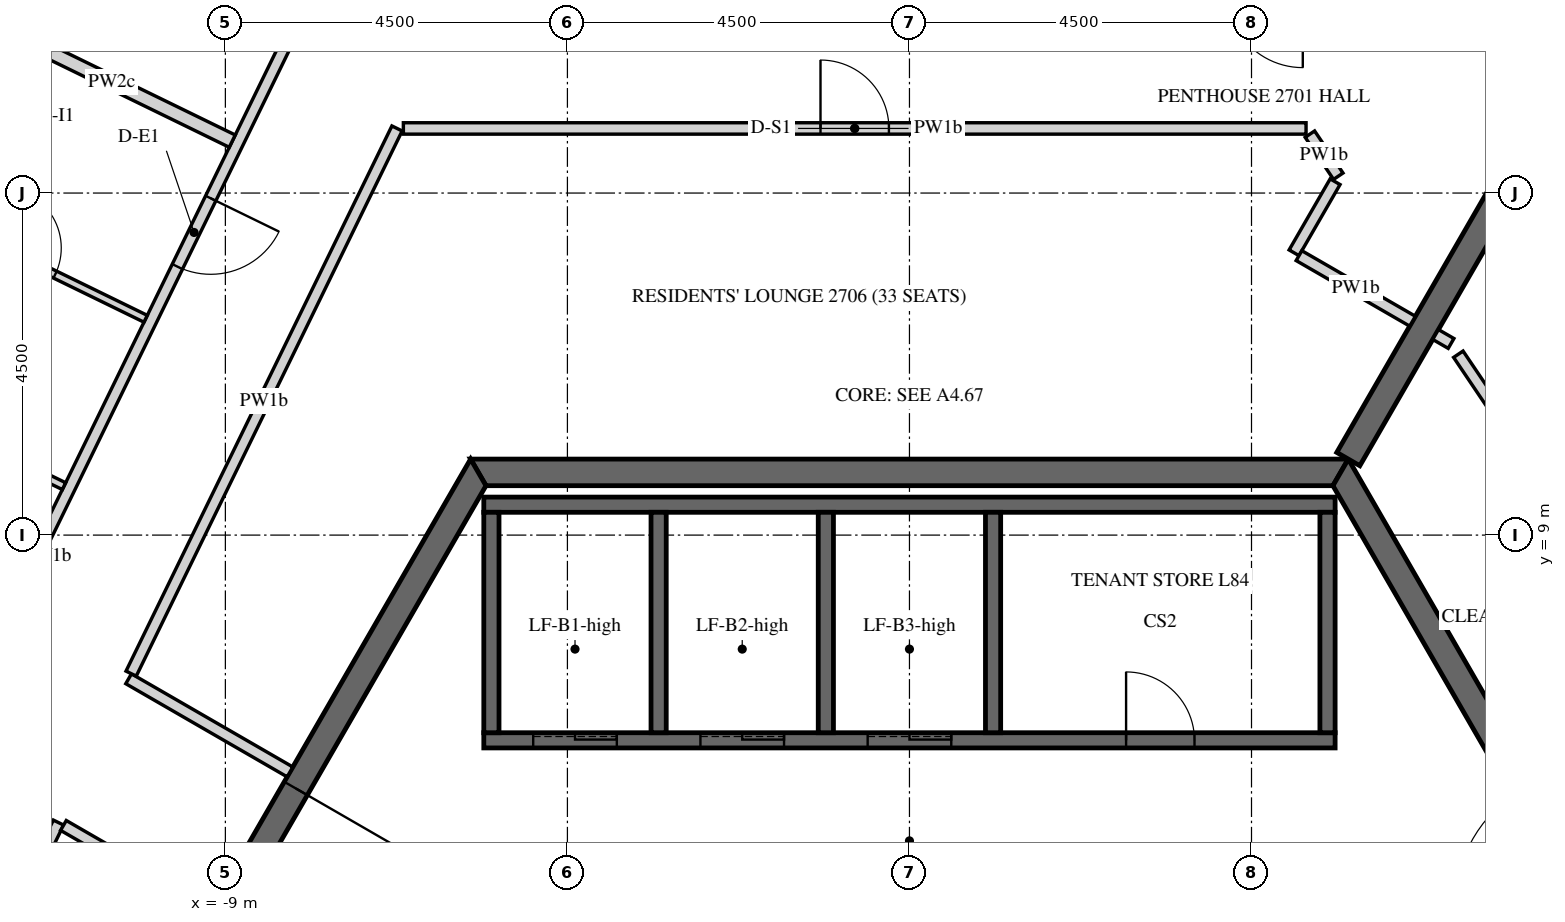
"""IFC4 building model, lengths in metres.
Left out: names, types, materials, properties, quantities, classifications, styles, units other than length and angle.
Written with IfcOpenShell. Run it as: python <this file> out.ifc"""

import sys

from ifc_helpers import new_model, si_unit, direction, frame, frame_2d, origin, place, context, subcontext, project, spatial, polyline, rectangle, outline, extrude, element, fill, save


model = new_model("IFC4")
c1 = context("Model", 3, precision=1e-05, world=origin(), true_north=direction((0.0, 1.0)))
c2 = subcontext(c1, "Body", "Model", "MODEL_VIEW")
j1 = project(units=[si_unit("LENGTHUNIT", "METRE"), si_unit("PLANEANGLEUNIT", "RADIAN")], contexts=[c1])
p1 = place(None, origin())
s1 = spatial("IfcSite", under=j1, at=p1, CompositionType="ELEMENT")
p2 = place(p1, origin())
s2 = spatial("IfcBuilding", under=s1, at=p2, CompositionType="ELEMENT")
p3 = place(p2, frame((0.0, 0.0, 349.5)))
s3 = spatial("IfcBuildingStorey", under=s2, at=p3, CompositionType="ELEMENT", Elevation=349.5)
p4 = place(p3, frame((-5.673, 9.825, 0.0), z_axis=(0.0, 0.0, 1.0), x_axis=(-0.499995046907, -0.866028263435, 0.0)))
e1 = element("IfcWall", 1, at=p4, inside=s3, PredefinedType="SHEAR", context=c2, shape_type="SweptSolid", body=[
    extrude(outline(polyline([(-0.101, -0.175), (11.446, -0.175), (11.244, 0.175), (0.101, 0.175), (-0.101, -0.175)])), origin(), (0.0, 0.0, 1.0), 3.75),
])
p5 = place(p4, frame((4.801, 0.0, 0.0)))
e2 = element("IfcOpeningElement", 2, at=p5, cuts=e1, PredefinedType="OPENING", context=c2, shape_type="SweptSolid", body=[
    extrude(rectangle(XDim=1.8, YDim=2.4, at=frame_2d((0.9, 1.2))), frame((0.0, 0.185, 0.0), z_axis=(0.0, -1.0, 0.0), x_axis=(1.0, 0.0, 0.0)), (0.0, 0.0, 1.0), 0.37),
])
p6 = place(p3, frame((11.345, 0.0, 0.0), z_axis=(0.0, 0.0, 1.0), x_axis=(-0.499995046907, 0.866028263435, 0.0)))
e3 = element("IfcWall", 3, at=p6, inside=s3, PredefinedType="SHEAR", context=c2, shape_type="SweptSolid", body=[
    extrude(outline(polyline([(-0.101, -0.175), (11.446, -0.175), (11.244, 0.175), (0.101, 0.175), (-0.101, -0.175)])), origin(), (0.0, 0.0, 1.0), 3.75),
])
p7 = place(p6, frame((4.744, 0.0, 0.0)))
e4 = element("IfcOpeningElement", 4, at=p7, cuts=e3, PredefinedType="OPENING", context=c2, shape_type="SweptSolid", body=[
    extrude(rectangle(XDim=1.8, YDim=2.4, at=frame_2d((0.9, 1.2))), frame((0.0, 0.185, 0.0), z_axis=(0.0, -1.0, 0.0), x_axis=(1.0, 0.0, 0.0)), (0.0, 0.0, 1.0), 0.37),
])
p8 = place(p3, frame((5.673, 9.825, 0.0), z_axis=(0.0, 0.0, 1.0), x_axis=(-1.0, 0.0, 0.0)))
e5 = element("IfcWall", 5, at=p8, inside=s3, PredefinedType="SHEAR", context=c2, shape_type="SweptSolid", body=[
    extrude(outline(polyline([(-0.101, -0.175), (11.446, -0.175), (11.244, 0.175), (0.101, 0.175), (-0.101, -0.175)])), origin(), (0.0, 0.0, 1.0), 3.75),
])
p9 = place(p3, frame((5.773, 10.0, 0.0), z_axis=(0.0, 0.0, 1.0), x_axis=(0.500007911273, 0.866020836161, 0.0)))
e6 = element("IfcWall", 6, at=p9, inside=s3, PredefinedType="SHEAR", context=c2, shape_type="SweptSolid", body=[
    extrude(rectangle(XDim=14.51, YDim=0.35, at=frame_2d((7.255, 0.0))), origin(), (0.0, 0.0, 1.0), 3.75),
])
p10 = place(p9, frame((6.355, 0.0, 0.0)))
e7 = element("IfcOpeningElement", 7, at=p10, cuts=e6, PredefinedType="OPENING", context=c2, shape_type="SweptSolid", body=[
    extrude(rectangle(XDim=1.8, YDim=2.4, at=frame_2d((0.9, 1.2))), frame((0.0, 0.185, 0.0), z_axis=(0.0, -1.0, 0.0), x_axis=(1.0, 0.0, 0.0)), (0.0, 0.0, 1.0), 0.37),
])
p11 = place(p3, frame((-5.6, 6.3, -0.5), z_axis=(0.0, 0.0, 1.0), x_axis=(1.0, 0.0, 0.0)))
e8 = element("IfcWall", 8, at=p11, inside=s3, PredefinedType="SHEAR", context=c2, shape_type="SweptSolid", body=[
    extrude(rectangle(XDim=11.2, YDim=0.2, at=frame_2d((5.6, 0.0))), origin(), (0.0, 0.0, 1.0), 4.15),
])
p12 = place(p11, frame((8.45, 0.0, 0.5)))
e9 = element("IfcOpeningElement", 9, at=p12, cuts=e8, PredefinedType="OPENING", context=c2, shape_type="SweptSolid", body=[
    extrude(rectangle(XDim=0.9, YDim=2.1, at=frame_2d((0.45, 1.05))), frame((0.0, 0.11, 0.0), z_axis=(0.0, -1.0, 0.0), x_axis=(1.0, 0.0, 0.0)), (0.0, 0.0, 1.0), 0.22),
])
p13 = place(p11, frame((0.65, 0.0, 0.5)))
e10 = element("IfcOpeningElement", 10, at=p13, cuts=e8, PredefinedType="OPENING", context=c2, shape_type="SweptSolid", body=[
    extrude(rectangle(XDim=1.1, YDim=2.1, at=frame_2d((0.55, 1.05))), frame((0.0, 0.11, 0.0), z_axis=(0.0, -1.0, 0.0), x_axis=(1.0, 0.0, 0.0)), (0.0, 0.0, 1.0), 0.22),
])
p14 = place(p11, frame((2.85, 0.0, 0.5)))
e11 = element("IfcOpeningElement", 11, at=p14, cuts=e8, PredefinedType="OPENING", context=c2, shape_type="SweptSolid", body=[
    extrude(rectangle(XDim=1.1, YDim=2.1, at=frame_2d((0.55, 1.05))), frame((0.0, 0.11, 0.0), z_axis=(0.0, -1.0, 0.0), x_axis=(1.0, 0.0, 0.0)), (0.0, 0.0, 1.0), 0.22),
])
p15 = place(p11, frame((5.05, 0.0, 0.5)))
e12 = element("IfcOpeningElement", 12, at=p15, cuts=e8, PredefinedType="OPENING", context=c2, shape_type="SweptSolid", body=[
    extrude(rectangle(XDim=1.1, YDim=2.1, at=frame_2d((0.55, 1.05))), frame((0.0, 0.11, 0.0), z_axis=(0.0, -1.0, 0.0), x_axis=(1.0, 0.0, 0.0)), (0.0, 0.0, 1.0), 0.22),
])
p16 = place(p3, frame((-5.6, 9.4, -0.5), z_axis=(0.0, 0.0, 1.0), x_axis=(1.0, 0.0, 0.0)))
e13 = element("IfcWall", 13, at=p16, inside=s3, PredefinedType="SHEAR", context=c2, shape_type="SweptSolid", body=[
    extrude(rectangle(XDim=11.2, YDim=0.2, at=frame_2d((5.6, 0.0))), origin(), (0.0, 0.0, 1.0), 4.15),
])
for number, where, z_axis, x_axis in (
    (14, (-5.5, 6.4, -0.5), (0.0, 0.0, 1.0), (0.0, 1.0, 0.0)),
    (15, (-3.3, 6.4, -0.5), (0.0, 0.0, 1.0), (0.0, 1.0, 0.0)),
    (16, (-1.1, 6.4, -0.5), (0.0, 0.0, 1.0), (0.0, 1.0, 0.0)),
    (17, (1.1, 6.4, -0.5), (0.0, 0.0, 1.0), (0.0, 1.0, 0.0)),
    (18, (5.5, 6.4, -0.5), (0.0, 0.0, 1.0), (0.0, 1.0, 0.0)),
):
    element("IfcWall", number, at=place(p3, frame(where, z_axis=z_axis, x_axis=x_axis)), inside=s3, PredefinedType="SHEAR", context=c2, shape_type="SweptSolid", body=[
        extrude(rectangle(XDim=2.9, YDim=0.2, at=frame_2d((1.45, 0.0))), origin(), (0.0, 0.0, 1.0), 4.15),
    ])
p17 = place(p3, frame((-7.903, 16.075, 0.0), z_axis=(0.0, 0.0, 1.0), x_axis=(-0.438364761272, -0.898797160696, 0.0)))
e19 = element("IfcWall", 19, at=p17, inside=s3, PredefinedType="PARTITIONING", context=c2, shape_type="SweptSolid", body=[
    extrude(rectangle(XDim=15.688, YDim=0.15, at=frame_2d((7.844, 0.0))), origin(), (0.0, 0.0, 1.0), 2.82),
])
p18 = place(p17, frame((2.942, 0.0, 0.0)))
e20 = element("IfcOpeningElement", 20, at=p18, cuts=e19, PredefinedType="OPENING", context=c2, shape_type="SweptSolid", body=[
    extrude(rectangle(XDim=1.0, YDim=2.1, at=frame_2d((0.5, 1.05))), frame((0.0, 0.085, 0.0), z_axis=(0.0, -1.0, 0.0), x_axis=(1.0, 0.0, 0.0)), (0.0, 0.0, 1.0), 0.17),
])
p19 = place(p3, frame((-13.466, 0.564, 0.0), z_axis=(0.0, 0.0, 1.0), x_axis=(0.438366040624, 0.898796536724, 0.0)))
e21 = element("IfcWall", 21, at=p19, inside=s3, PredefinedType="PARTITIONING", context=c2, shape_type="SweptSolid", body=[
    extrude(rectangle(XDim=5.178, YDim=0.15, at=frame_2d((2.589, 0.0))), origin(), (0.0, 0.0, 1.0), 2.82),
])
p20 = place(p3, frame((-11.131, 5.18, 0.0), z_axis=(0.0, 0.0, 1.0), x_axis=(0.866037886895, -0.499978377995, 0.0)))
e22 = element("IfcWall", 22, at=p20, inside=s3, PredefinedType="PARTITIONING", context=c2, shape_type="SweptSolid", body=[
    extrude(rectangle(XDim=2.229, YDim=0.15, at=frame_2d((1.115, 0.0))), origin(), (0.0, 0.0, 1.0), 2.82),
])
p21 = place(p3, frame((-8.15, 5.884, 0.0), z_axis=(0.0, 0.0, 1.0), x_axis=(-0.866009790468, 0.500027042082, 0.0)))
e23 = element("IfcWall", 23, at=p21, inside=s3, PredefinedType="PARTITIONING", context=c2, shape_type="SweptSolid", body=[
    extrude(rectangle(XDim=2.451, YDim=0.15, at=frame_2d((1.226, 0.0))), origin(), (0.0, 0.0, 1.0), 2.82),
])
p22 = place(p3, frame((-10.24, 7.178, 0.0), z_axis=(0.0, 0.0, 1.0), x_axis=(0.438356120288, 0.898801375058, 0.0)))
e24 = element("IfcWall", 24, at=p22, inside=s3, PredefinedType="PARTITIONING", context=c2, shape_type="SweptSolid", body=[
    extrude(rectangle(XDim=7.98, YDim=0.15, at=frame_2d((3.99, 0.0))), origin(), (0.0, 0.0, 1.0), 2.82),
])
p23 = place(p3, frame((-6.658, 14.35, 0.0), z_axis=(0.0, 0.0, 1.0), x_axis=(1.0, 0.0, 0.0)))
e25 = element("IfcWall", 25, at=p23, inside=s3, PredefinedType="PARTITIONING", context=c2, shape_type="SweptSolid", body=[
    extrude(rectangle(XDim=11.876, YDim=0.15, at=frame_2d((5.938, 0.0))), origin(), (0.0, 0.0, 1.0), 2.82),
])
p24 = place(p23, frame((5.488, 0.0, 0.0)))
e26 = element("IfcOpeningElement", 26, at=p24, cuts=e25, PredefinedType="OPENING", context=c2, shape_type="SweptSolid", body=[
    extrude(rectangle(XDim=0.9, YDim=2.1, at=frame_2d((0.45, 1.05))), frame((0.0, 0.085, 0.0), z_axis=(0.0, -1.0, 0.0), x_axis=(1.0, 0.0, 0.0)), (0.0, 0.0, 1.0), 0.17),
])
p25 = place(p3, frame((5.268, 14.275, 0.0), z_axis=(0.0, 0.0, 1.0), x_axis=(0.559416337009, -0.828886820915, 0.0)))
e27 = element("IfcWall", 27, at=p25, inside=s3, PredefinedType="PARTITIONING", context=c2, shape_type="SweptSolid", body=[
    extrude(rectangle(XDim=0.668, YDim=0.15, at=frame_2d((0.334, 0.0))), origin(), (0.0, 0.0, 1.0), 2.82),
])
p26 = place(p3, frame((5.6, 13.649, 0.0), z_axis=(0.0, 0.0, 1.0), x_axis=(-0.500126914667, -0.865952117167, 0.0)))
e28 = element("IfcWall", 28, at=p26, inside=s3, PredefinedType="PARTITIONING", context=c2, shape_type="SweptSolid", body=[
    extrude(rectangle(XDim=1.08, YDim=0.15, at=frame_2d((0.54, 0.0))), origin(), (0.0, 0.0, 1.0), 2.82),
])
p27 = place(p3, frame((5.125, 12.677, 0.0), z_axis=(0.0, 0.0, 1.0), x_axis=(0.866013532718, -0.500020560727, 0.0)))
e29 = element("IfcWall", 29, at=p27, inside=s3, PredefinedType="PARTITIONING", context=c2, shape_type="SweptSolid", body=[
    extrude(rectangle(XDim=1.725, YDim=0.15, at=frame_2d((0.863, 0.0))), origin(), (0.0, 0.0, 1.0), 2.82),
])
p28 = place(p3, frame((6.922, 11.639, 0.0), z_axis=(0.0, 0.0, 1.0), x_axis=(0.866254745882, -0.499602557277, 0.0)))
e30 = element("IfcWall", 30, at=p28, inside=s3, PredefinedType="PARTITIONING", context=c2, shape_type="SweptSolid", body=[
    extrude(rectangle(XDim=0.235, YDim=0.15, at=frame_2d((0.118, 0.0))), origin(), (0.0, 0.0, 1.0), 2.82),
])
p29 = place(p3, frame((7.221, 11.38, 0.0), z_axis=(0.0, 0.0, 1.0), x_axis=(0.559200548931, -0.829032415576, 0.0)))
e31 = element("IfcWall", 31, at=p29, inside=s3, PredefinedType="PARTITIONING", context=c2, shape_type="SweptSolid", body=[
    extrude(rectangle(XDim=5.236, YDim=0.15, at=frame_2d((2.618, 0.0))), origin(), (0.0, 0.0, 1.0), 2.82),
])
p30 = place(p29, frame((2.168, 0.0, 0.0)))
e32 = element("IfcOpeningElement", 32, at=p30, cuts=e31, PredefinedType="OPENING", context=c2, shape_type="SweptSolid", body=[
    extrude(rectangle(XDim=0.9, YDim=2.1, at=frame_2d((0.45, 1.05))), frame((0.0, 0.085, 0.0), z_axis=(0.0, -1.0, 0.0), x_axis=(1.0, 0.0, 0.0)), (0.0, 0.0, 1.0), 0.17),
])
p31 = place(p3, frame((-12.078, 15.728, 0.0), z_axis=(0.0, 0.0, 1.0), x_axis=(0.898802391248, -0.438354036696, 0.0)))
e33 = element("IfcWall", 33, at=p31, inside=s3, PredefinedType="PARTITIONING", context=c2, shape_type="SweptSolid", body=[
    extrude(rectangle(XDim=3.525, YDim=0.18, at=frame_2d((1.762, 0.0))), origin(), (0.0, 0.0, 1.0), 2.82),
])
p32 = place(p3, frame((-13.217, 13.391, 0.0), z_axis=(0.0, 0.0, 1.0), x_axis=(0.898775101867, -0.438409986501, 0.0)))
e34 = element("IfcWall", 34, at=p32, inside=s3, PredefinedType="PARTITIONING", context=c2, shape_type="SweptSolid", body=[
    extrude(rectangle(XDim=3.525, YDim=0.1, at=frame_2d((1.763, 0.0))), origin(), (0.0, 0.0, 1.0), 2.82),
])
p33 = place(p32, frame((1.4, 0.0, 0.0)))
e35 = element("IfcOpeningElement", 35, at=p33, cuts=e34, PredefinedType="OPENING", context=c2, shape_type="SweptSolid", body=[
    extrude(rectangle(XDim=0.8, YDim=2.1, at=frame_2d((0.4, 1.05))), frame((0.0, 0.06, 0.0), z_axis=(0.0, -1.0, 0.0), x_axis=(1.0, 0.0, 0.0)), (0.0, 0.0, 1.0), 0.12),
])
p34 = place(p3, frame((-14.246, 11.167, 0.0), z_axis=(0.0, 0.0, 1.0), x_axis=(0.89880963085, -0.438339192283, 0.0)))
e36 = element("IfcWall", 36, at=p34, inside=s3, PredefinedType="PARTITIONING", context=c2, shape_type="SweptSolid", body=[
    extrude(rectangle(XDim=3.475, YDim=0.1, at=frame_2d((1.737, 0.0))), origin(), (0.0, 0.0, 1.0), 2.82),
])
p35 = place(p5, origin())
e37 = element("IfcDoor", 37, at=p35, inside=s3, OperationType="DOUBLE_DOOR_SINGLE_SWING", PredefinedType="DOOR", context=c2, shape_type="SweptSolid", body=[
    extrude(rectangle(XDim=1.8, YDim=2.4, at=frame_2d((0.9, 1.2))), frame((0.0, 0.025, 0.0), z_axis=(0.0, -1.0, 0.0), x_axis=(1.0, 0.0, 0.0)), (0.0, 0.0, 1.0), 0.05),
])
fill(e2, e37)
p36 = place(p12, origin())
e38 = element("IfcDoor", 38, at=p36, inside=s3, OperationType="SINGLE_SWING_LEFT", PredefinedType="DOOR", context=c2, shape_type="SweptSolid", body=[
    extrude(rectangle(XDim=0.9, YDim=2.1, at=frame_2d((0.45, 1.05))), frame((0.0, 0.025, 0.0), z_axis=(0.0, -1.0, 0.0), x_axis=(1.0, 0.0, 0.0)), (0.0, 0.0, 1.0), 0.05),
])
fill(e9, e38)
p37 = place(p13, origin())
e39 = element("IfcDoor", 39, at=p37, inside=s3, OperationType="SLIDING_TO_LEFT", PredefinedType="DOOR", context=c2, shape_type="SweptSolid", body=[
    extrude(rectangle(XDim=1.1, YDim=2.1, at=frame_2d((0.55, 1.05))), frame((0.0, 0.025, 0.0), z_axis=(0.0, -1.0, 0.0), x_axis=(1.0, 0.0, 0.0)), (0.0, 0.0, 1.0), 0.05),
])
fill(e10, e39)
p38 = place(p14, origin())
e40 = element("IfcDoor", 40, at=p38, inside=s3, OperationType="SLIDING_TO_LEFT", PredefinedType="DOOR", context=c2, shape_type="SweptSolid", body=[
    extrude(rectangle(XDim=1.1, YDim=2.1, at=frame_2d((0.55, 1.05))), frame((0.0, 0.025, 0.0), z_axis=(0.0, -1.0, 0.0), x_axis=(1.0, 0.0, 0.0)), (0.0, 0.0, 1.0), 0.05),
])
fill(e11, e40)
p39 = place(p15, origin())
e41 = element("IfcDoor", 41, at=p39, inside=s3, OperationType="SLIDING_TO_LEFT", PredefinedType="DOOR", context=c2, shape_type="SweptSolid", body=[
    extrude(rectangle(XDim=1.1, YDim=2.1, at=frame_2d((0.55, 1.05))), frame((0.0, 0.025, 0.0), z_axis=(0.0, -1.0, 0.0), x_axis=(1.0, 0.0, 0.0)), (0.0, 0.0, 1.0), 0.05),
])
fill(e12, e41)
p40 = place(p18, origin())
e42 = element("IfcDoor", 42, at=p40, inside=s3, OperationType="SINGLE_SWING_LEFT", PredefinedType="DOOR", context=c2, shape_type="SweptSolid", body=[
    extrude(rectangle(XDim=1.0, YDim=2.1, at=frame_2d((0.5, 1.05))), frame((0.0, 0.025, 0.0), z_axis=(0.0, -1.0, 0.0), x_axis=(1.0, 0.0, 0.0)), (0.0, 0.0, 1.0), 0.05),
])
fill(e20, e42)
p41 = place(p33, origin())
e43 = element("IfcDoor", 43, at=p41, inside=s3, OperationType="SINGLE_SWING_LEFT", PredefinedType="DOOR", context=c2, shape_type="SweptSolid", body=[
    extrude(rectangle(XDim=0.8, YDim=2.1, at=frame_2d((0.4, 1.05))), frame((0.0, 0.025, 0.0), z_axis=(0.0, -1.0, 0.0), x_axis=(1.0, 0.0, 0.0)), (0.0, 0.0, 1.0), 0.05),
])
fill(e35, e43)
p42 = place(p24, origin())
e44 = element("IfcDoor", 44, at=p42, inside=s3, OperationType="SINGLE_SWING_RIGHT", PredefinedType="DOOR", context=c2, shape_type="SweptSolid", body=[
    extrude(rectangle(XDim=0.9, YDim=2.1, at=frame_2d((0.45, 1.05))), frame((0.0, 0.025, 0.0), z_axis=(0.0, -1.0, 0.0), x_axis=(1.0, 0.0, 0.0)), (0.0, 0.0, 1.0), 0.05),
])
fill(e26, e44)
save(model, sys.argv[1])
